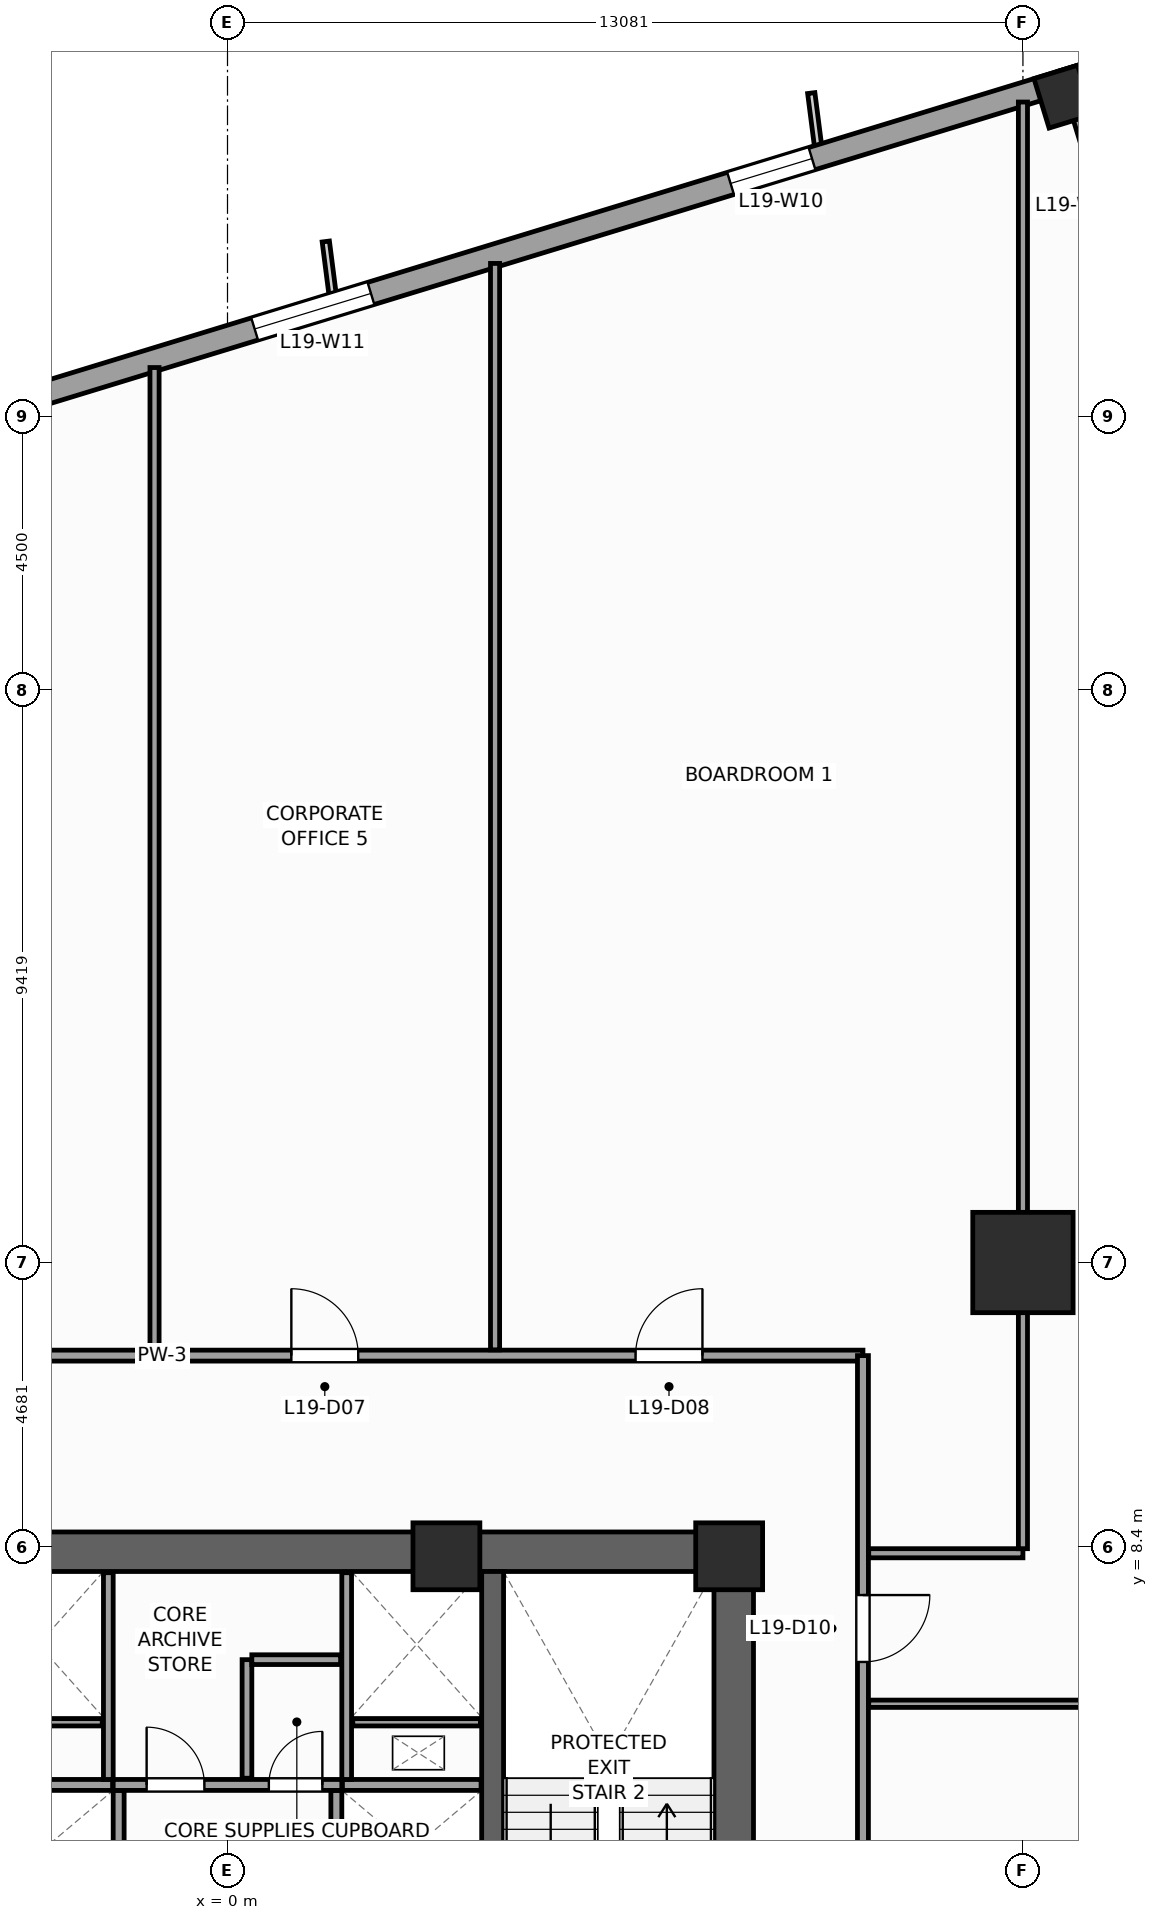
"""IFC4 building model, lengths in metres.
Left out: names, types, materials, properties, quantities, classifications, styles, units other than length and angle.
Written with IfcOpenShell. Run it as: python <this file> out.ifc"""

import sys

from ifc_helpers import new_model, si_unit, direction, frame, frame_2d, origin, origin_2d, place, context, subcontext, project, spatial, rectangle, extrude, source, transform, mapped, element, fill, save


model = new_model("IFC4")
c1 = context("Model", 3, precision=1e-05, world=origin(), true_north=direction((0.0, 1.0)))
c2 = subcontext(c1, "Body", "Model", "MODEL_VIEW")
j1 = project(units=[si_unit("LENGTHUNIT", "METRE"), si_unit("PLANEANGLEUNIT", "RADIAN")], contexts=[c1])
p1 = place(None, origin())
s1 = spatial("IfcSite", under=j1, at=p1, CompositionType="ELEMENT")
p2 = place(p1, origin())
s2 = spatial("IfcBuilding", under=s1, at=p2, CompositionType="ELEMENT")
p3 = place(p2, frame((0.0, 0.0, 83.2)))
s3 = spatial("IfcBuildingStorey", under=s2, at=p3, CompositionType="ELEMENT", Elevation=83.2)
p4 = place(p3, frame((-8.65, 8.325, 0.0), z_axis=(0.0, 0.0, 1.0), x_axis=(1.0, 0.0, 0.0)))
e1 = element("IfcWall", 1, at=p4, inside=s3, PredefinedType="SHEAR", context=c2, shape_type="SweptSolid", body=[
    extrude(rectangle(XDim=17.3, YDim=0.65, at=frame_2d((8.65, 0.0))), origin(), (0.0, 0.0, 1.0), 4.0),
])
p5 = place(p3, frame((8.325, -8.0, 0.0), z_axis=(0.0, 0.0, 1.0), x_axis=(0.0, 1.0, 0.0)))
e2 = element("IfcWall", 2, at=p5, inside=s3, PredefinedType="SHEAR", context=c2, shape_type="SweptSolid", body=[
    extrude(rectangle(XDim=16.0, YDim=0.65, at=frame_2d((8.0, 0.0))), origin(), (0.0, 0.0, 1.0), 4.0),
])
p6 = place(p5, frame((4.69, 0.0, 0.0)))
e3 = element("IfcOpeningElement", 3, at=p6, cuts=e2, PredefinedType="OPENING", context=c2, shape_type="SweptSolid", body=[
    extrude(rectangle(XDim=1.3, YDim=2.2, at=frame_2d((0.65, 1.1))), frame((0.0, 0.335, 0.0), z_axis=(0.0, -1.0, 0.0), x_axis=(1.0, 0.0, 0.0)), (0.0, 0.0, 1.0), 0.67),
])
p7 = place(p3, frame((4.36, -8.0, 0.0), z_axis=(0.0, 0.0, 1.0), x_axis=(0.0, 1.0, 0.0)))
e4 = element("IfcWall", 4, at=p7, inside=s3, PredefinedType="SHEAR", context=c2, shape_type="SweptSolid", body=[
    extrude(rectangle(XDim=16.0, YDim=0.36, at=frame_2d((8.0, 0.0))), origin(), (0.0, 0.0, 1.0), 4.0),
])
m1 = source(origin(), c2, "Body", "SweptSolid", [
    extrude(rectangle(XDim=1.1, YDim=1.1, at=origin_2d()), origin(), (0.0, 0.0, 1.0), 4.0),
])
for number, where, z_axis, x_axis in (
    (5, (8.25, 8.25, 0.0), (0.0, 0.0, 1.0), (1.0, 0.0, 0.0)),
    (6, (3.6, 8.25, 0.0), (0.0, 0.0, 1.0), (1.0, 0.0, 0.0)),
):
    element("IfcColumn", number, at=place(p3, frame(where, z_axis=z_axis, x_axis=x_axis)), inside=s3, PredefinedType="PILASTER", context=c2, shape_type="MappedRepresentation", body=[
        mapped(m1, transform((0.0, 0.0, 0.0), scale=1.0)),
    ])
m2 = source(origin(), c2, "Body", "SweptSolid", [
    extrude(rectangle(XDim=1.65, YDim=1.65, at=origin_2d()), origin(), (0.0, 0.0, 1.0), 4.0),
])
p8 = place(p3, frame((13.081, 13.081, 0.0), z_axis=(0.0, 0.0, 1.0), x_axis=(1.0, 0.0, 0.0)))
e7 = element("IfcColumn", 7, at=p8, inside=s3, PredefinedType="COLUMN", context=c2, shape_type="MappedRepresentation", body=[
    mapped(m2, transform((0.0, 0.0, 0.0), scale=1.0)),
])
m3 = source(origin(), c2, "Body", "SweptSolid", [
    extrude(rectangle(XDim=0.75, YDim=0.85, at=origin_2d()), origin(), (0.0, 0.0, 1.0), 4.0),
])
p9 = place(p3, frame((13.746, 32.253, 0.0), z_axis=(0.0, 0.0, 1.0), x_axis=(0.956304755963, 0.292371704723, 0.0)))
e8 = element("IfcColumn", 8, at=p9, inside=s3, PredefinedType="COLUMN", context=c2, shape_type="MappedRepresentation", body=[
    mapped(m3, transform((0.0, 0.0, 0.0), scale=1.0)),
])
p10 = place(p3, frame((15.144, 28.482, 0.0), z_axis=(0.0, 0.0, 1.0), x_axis=(-0.292373601522, 0.956304176051, 0.0)))
e9 = element("IfcWall", 9, at=p10, inside=s3, PredefinedType="STANDARD", context=c2, shape_type="SweptSolid", body=[
    extrude(rectangle(XDim=4.44, YDim=0.38, at=frame_2d((2.22, 0.0))), origin(), (0.0, 0.0, 1.0), 3.04),
])
p11 = place(p10, frame((1.52, 0.0, 0.51)))
e10 = element("IfcOpeningElement", 10, at=p11, cuts=e9, PredefinedType="OPENING", context=c2, shape_type="SweptSolid", body=[
    extrude(rectangle(XDim=1.4, YDim=2.4, at=frame_2d((0.7, 1.2))), frame((0.0, 0.2, 0.0), z_axis=(0.0, -1.0, 0.0), x_axis=(1.0, 0.0, 0.0)), (0.0, 0.0, 1.0), 0.4),
])
p12 = place(p3, frame((14.265, 32.658, 0.0), z_axis=(0.0, 0.0, 1.0), x_axis=(-0.956304320851, -0.292373127906, 0.0)))
e11 = element("IfcWall", 11, at=p12, inside=s3, PredefinedType="STANDARD", context=c2, shape_type="SweptSolid", body=[
    extrude(rectangle(XDim=46.38, YDim=0.38, at=frame_2d((23.19, 0.0))), origin(), (0.0, 0.0, 1.0), 3.14),
])
p13 = place(p12, frame((4.865, 0.0, 0.51)))
e12 = element("IfcOpeningElement", 12, at=p13, cuts=e11, PredefinedType="OPENING", context=c2, shape_type="SweptSolid", body=[
    extrude(rectangle(XDim=1.4, YDim=2.4, at=frame_2d((0.7, 1.2))), frame((0.0, 0.2, 0.0), z_axis=(0.0, -1.0, 0.0), x_axis=(1.0, 0.0, 0.0)), (0.0, 0.0, 1.0), 0.4),
])
p14 = place(p12, frame((12.45, 0.0, 0.51)))
e13 = element("IfcOpeningElement", 13, at=p14, cuts=e11, PredefinedType="OPENING", context=c2, shape_type="SweptSolid", body=[
    extrude(rectangle(XDim=2.0, YDim=2.4, at=frame_2d((1.0, 1.2))), frame((0.0, 0.2, 0.0), z_axis=(0.0, -1.0, 0.0), x_axis=(1.0, 0.0, 0.0)), (0.0, 0.0, 1.0), 0.4),
])
p15 = place(p12, frame((19.012, 0.0, 0.51)))
e14 = element("IfcOpeningElement", 14, at=p15, cuts=e11, PredefinedType="OPENING", context=c2, shape_type="SweptSolid", body=[
    extrude(rectangle(XDim=2.0, YDim=2.4, at=frame_2d((1.0, 1.2))), frame((0.0, 0.2, 0.0), z_axis=(0.0, -1.0, 0.0), x_axis=(1.0, 0.0, 0.0)), (0.0, 0.0, 1.0), 0.4),
])
p16 = place(p12, frame((30.538, 0.0, 0.51)))
e15 = element("IfcOpeningElement", 15, at=p16, cuts=e11, PredefinedType="OPENING", context=c2, shape_type="SweptSolid", body=[
    extrude(rectangle(XDim=2.0, YDim=2.4, at=frame_2d((1.0, 1.2))), frame((0.0, 0.2, 0.0), z_axis=(0.0, -1.0, 0.0), x_axis=(1.0, 0.0, 0.0)), (0.0, 0.0, 1.0), 0.4),
])
p17 = place(p12, frame((39.187, 0.0, 0.51)))
e16 = element("IfcOpeningElement", 16, at=p17, cuts=e11, PredefinedType="OPENING", context=c2, shape_type="SweptSolid", body=[
    extrude(rectangle(XDim=1.4, YDim=2.4, at=frame_2d((0.7, 1.2))), frame((0.0, 0.2, 0.0), z_axis=(0.0, -1.0, 0.0), x_axis=(1.0, 0.0, 0.0)), (0.0, 0.0, 1.0), 0.4),
])
p18 = place(p3, frame((-1.79, -7.98, 0.0), z_axis=(0.0, 0.0, 1.0), x_axis=(0.0, 1.0, 0.0)))
e17 = element("IfcWall", 17, at=p18, inside=s3, PredefinedType="PARTITIONING", context=c2, shape_type="SweptSolid", body=[
    extrude(rectangle(XDim=12.38, YDim=0.18, at=frame_2d((6.19, 0.0))), origin(), (0.0, 0.0, 1.0), 3.74),
])
p19 = place(p18, frame((0.4, 0.0, 0.0)))
e18 = element("IfcOpeningElement", 18, at=p19, cuts=e17, PredefinedType="OPENING", context=c2, shape_type="SweptSolid", body=[
    extrude(rectangle(XDim=1.1, YDim=2.2, at=frame_2d((0.55, 1.1))), frame((0.0, 0.1, 0.0), z_axis=(0.0, -1.0, 0.0), x_axis=(1.0, 0.0, 0.0)), (0.0, 0.0, 1.0), 0.2),
])
p20 = place(p18, frame((2.46, 0.0, 0.0)))
e19 = element("IfcOpeningElement", 19, at=p20, cuts=e17, PredefinedType="OPENING", context=c2, shape_type="SweptSolid", body=[
    extrude(rectangle(XDim=1.1, YDim=2.2, at=frame_2d((0.55, 1.1))), frame((0.0, 0.1, 0.0), z_axis=(0.0, -1.0, 0.0), x_axis=(1.0, 0.0, 0.0)), (0.0, 0.0, 1.0), 0.2),
])
p21 = place(p3, frame((1.79, -7.98, 0.0), z_axis=(0.0, 0.0, 1.0), x_axis=(0.0, 1.0, 0.0)))
e20 = element("IfcWall", 20, at=p21, inside=s3, PredefinedType="PARTITIONING", context=c2, shape_type="SweptSolid", body=[
    extrude(rectangle(XDim=12.38, YDim=0.18, at=frame_2d((6.19, 0.0))), origin(), (0.0, 0.0, 1.0), 3.74),
])
p22 = place(p21, frame((0.4, 0.0, 0.0)))
e21 = element("IfcOpeningElement", 21, at=p22, cuts=e20, PredefinedType="OPENING", context=c2, shape_type="SweptSolid", body=[
    extrude(rectangle(XDim=1.1, YDim=2.2, at=frame_2d((0.55, 1.1))), frame((0.0, 0.1, 0.0), z_axis=(0.0, -1.0, 0.0), x_axis=(1.0, 0.0, 0.0)), (0.0, 0.0, 1.0), 0.2),
])
p23 = place(p21, frame((2.46, 0.0, 0.0)))
e22 = element("IfcOpeningElement", 22, at=p23, cuts=e20, PredefinedType="OPENING", context=c2, shape_type="SweptSolid", body=[
    extrude(rectangle(XDim=1.1, YDim=2.2, at=frame_2d((0.55, 1.1))), frame((0.0, 0.1, 0.0), z_axis=(0.0, -1.0, 0.0), x_axis=(1.0, 0.0, 0.0)), (0.0, 0.0, 1.0), 0.2),
])
p24 = place(p3, frame((-1.88, 4.49, 0.0), z_axis=(0.0, 0.0, 1.0), x_axis=(1.0, 0.0, 0.0)))
e23 = element("IfcWall", 23, at=p24, inside=s3, PredefinedType="PARTITIONING", context=c2, shape_type="SweptSolid", body=[
    extrude(rectangle(XDim=3.76, YDim=0.18, at=frame_2d((1.88, 0.0))), origin(), (0.0, 0.0, 1.0), 3.74),
])
p25 = place(p24, frame((0.55, 0.0, 0.0)))
e24 = element("IfcOpeningElement", 24, at=p25, cuts=e23, PredefinedType="OPENING", context=c2, shape_type="SweptSolid", body=[
    extrude(rectangle(XDim=0.95, YDim=2.1, at=frame_2d((0.475, 1.05))), frame((0.0, 0.1, 0.0), z_axis=(0.0, -1.0, 0.0), x_axis=(1.0, 0.0, 0.0)), (0.0, 0.0, 1.0), 0.2),
])
p26 = place(p24, frame((2.56, 0.0, 0.0)))
e25 = element("IfcOpeningElement", 25, at=p26, cuts=e23, PredefinedType="OPENING", context=c2, shape_type="SweptSolid", body=[
    extrude(rectangle(XDim=0.88, YDim=2.1, at=frame_2d((0.44, 1.05))), frame((0.0, 0.1, 0.0), z_axis=(0.0, -1.0, 0.0), x_axis=(1.0, 0.0, 0.0)), (0.0, 0.0, 1.0), 0.2),
])
for number, where, z_axis, x_axis in (
    (26, (-4.17, 4.49, 0.0), (0.0, 0.0, 1.0), (1.0, 0.0, 0.0)),
    (27, (1.89, 4.49, 0.0), (0.0, 0.0, 1.0), (1.0, 0.0, 0.0)),
):
    element("IfcWall", number, at=place(p3, frame(where, z_axis=z_axis, x_axis=x_axis)), inside=s3, PredefinedType="PARTITIONING", context=c2, shape_type="SweptSolid", body=[
        extrude(rectangle(XDim=2.28, YDim=0.18, at=frame_2d((1.14, 0.0))), origin(), (0.0, 0.0, 1.0), 3.74),
    ])
for number, where, z_axis, x_axis in (
    (28, (-1.96, 4.58, 0.0), (0.0, 0.0, 1.0), (0.0, 1.0, 0.0)),
    (29, (1.96, 4.58, 0.0), (0.0, 0.0, 1.0), (0.0, 1.0, 0.0)),
):
    element("IfcWall", number, at=place(p3, frame(where, z_axis=z_axis, x_axis=x_axis)), inside=s3, PredefinedType="PARTITIONING", context=c2, shape_type="SweptSolid", body=[
        extrude(rectangle(XDim=3.4, YDim=0.16, at=frame_2d((1.7, 0.0))), origin(), (0.0, 0.0, 1.0), 3.74),
    ])
for number, where, z_axis, x_axis in (
    (30, (-4.16, 5.52, 0.0), (0.0, 0.0, 1.0), (1.0, 0.0, 0.0)),
    (31, (2.06, 5.52, 0.0), (0.0, 0.0, 1.0), (1.0, 0.0, 0.0)),
):
    element("IfcWall", number, at=place(p3, frame(where, z_axis=z_axis, x_axis=x_axis)), inside=s3, PredefinedType="PARTITIONING", context=c2, shape_type="SweptSolid", body=[
        extrude(rectangle(XDim=2.1, YDim=0.12, at=frame_2d((1.05, 0.0))), origin(), (0.0, 0.0, 1.0), 3.74),
    ])
p27 = place(p3, frame((0.32, 4.6, 0.0), z_axis=(0.0, 0.0, 1.0), x_axis=(0.0, 1.0, 0.0)))
e32 = element("IfcWall", 32, at=p27, inside=s3, PredefinedType="PARTITIONING", context=c2, shape_type="SweptSolid", body=[
    extrude(rectangle(XDim=1.95, YDim=0.16, at=frame_2d((0.975, 0.0))), origin(), (0.0, 0.0, 1.0), 3.74),
])
p28 = place(p3, frame((0.4, 6.55, 0.0), z_axis=(0.0, 0.0, 1.0), x_axis=(1.0, 0.0, 0.0)))
e33 = element("IfcWall", 33, at=p28, inside=s3, PredefinedType="PARTITIONING", context=c2, shape_type="SweptSolid", body=[
    extrude(rectangle(XDim=1.46, YDim=0.16, at=frame_2d((0.73, 0.0))), origin(), (0.0, 0.0, 1.0), 3.74),
])
p29 = place(p3, frame((-12.6, 11.55, 0.0), z_axis=(0.0, 0.0, 1.0), x_axis=(1.0, 0.0, 0.0)))
e34 = element("IfcWall", 34, at=p29, inside=s3, PredefinedType="PARTITIONING", context=c2, shape_type="SweptSolid", body=[
    extrude(rectangle(XDim=23.05, YDim=0.18, at=frame_2d((11.525, 0.0))), origin(), (0.0, 0.0, 1.0), 3.74),
])
p30 = place(p29, frame((2.514, 0.0, 0.0)))
e35 = element("IfcOpeningElement", 35, at=p30, cuts=e34, PredefinedType="OPENING", context=c2, shape_type="SweptSolid", body=[
    extrude(rectangle(XDim=1.1, YDim=2.2, at=frame_2d((0.55, 1.1))), frame((0.0, 0.1, 0.0), z_axis=(0.0, -1.0, 0.0), x_axis=(1.0, 0.0, 0.0)), (0.0, 0.0, 1.0), 0.2),
])
p31 = place(p29, frame((8.05, 0.0, 0.0)))
e36 = element("IfcOpeningElement", 36, at=p31, cuts=e34, PredefinedType="OPENING", context=c2, shape_type="SweptSolid", body=[
    extrude(rectangle(XDim=1.1, YDim=2.2, at=frame_2d((0.55, 1.1))), frame((0.0, 0.1, 0.0), z_axis=(0.0, -1.0, 0.0), x_axis=(1.0, 0.0, 0.0)), (0.0, 0.0, 1.0), 0.2),
])
p32 = place(p29, frame((13.65, 0.0, 0.0)))
e37 = element("IfcOpeningElement", 37, at=p32, cuts=e34, PredefinedType="OPENING", context=c2, shape_type="SweptSolid", body=[
    extrude(rectangle(XDim=1.1, YDim=2.2, at=frame_2d((0.55, 1.1))), frame((0.0, 0.1, 0.0), z_axis=(0.0, -1.0, 0.0), x_axis=(1.0, 0.0, 0.0)), (0.0, 0.0, 1.0), 0.2),
])
p33 = place(p29, frame((19.311, 0.0, 0.0)))
e38 = element("IfcOpeningElement", 38, at=p33, cuts=e34, PredefinedType="OPENING", context=c2, shape_type="SweptSolid", body=[
    extrude(rectangle(XDim=1.1, YDim=2.2, at=frame_2d((0.55, 1.1))), frame((0.0, 0.1, 0.0), z_axis=(0.0, -1.0, 0.0), x_axis=(1.0, 0.0, 0.0)), (0.0, 0.0, 1.0), 0.2),
])
p34 = place(p3, frame((10.45, 3.35, 0.0), z_axis=(0.0, 0.0, 1.0), x_axis=(0.0, 1.0, 0.0)))
e39 = element("IfcWall", 39, at=p34, inside=s3, PredefinedType="PARTITIONING", context=c2, shape_type="SweptSolid", body=[
    extrude(rectangle(XDim=8.2, YDim=0.18, at=frame_2d((4.1, 0.0))), origin(), (0.0, 0.0, 1.0), 3.74),
])
p35 = place(p34, frame((3.163, 0.0, 0.0)))
e40 = element("IfcOpeningElement", 40, at=p35, cuts=e39, PredefinedType="OPENING", context=c2, shape_type="SweptSolid", body=[
    extrude(rectangle(XDim=1.1, YDim=2.2, at=frame_2d((0.55, 1.1))), frame((0.0, 0.1, 0.0), z_axis=(0.0, -1.0, 0.0), x_axis=(1.0, 0.0, 0.0)), (0.0, 0.0, 1.0), 0.2),
])
p36 = place(p3, frame((-1.2, 11.645, 0.0), z_axis=(0.0, 0.0, 1.0), x_axis=(0.0, 1.0, 0.0)))
e41 = element("IfcWall", 41, at=p36, inside=s3, PredefinedType="PARTITIONING", context=c2, shape_type="SweptSolid", body=[
    extrude(rectangle(XDim=16.154, YDim=0.15, at=frame_2d((8.077, 0.0))), origin(), (0.0, 0.0, 1.0), 3.74),
])
p37 = place(p3, frame((4.4, 11.645, 0.0), z_axis=(0.0, 0.0, 1.0), x_axis=(0.0, 1.0, 0.0)))
e42 = element("IfcWall", 42, at=p37, inside=s3, PredefinedType="PARTITIONING", context=c2, shape_type="SweptSolid", body=[
    extrude(rectangle(XDim=17.866, YDim=0.15, at=frame_2d((8.933, 0.0))), origin(), (0.0, 0.0, 1.0), 3.74),
])
p38 = place(p3, frame((10.545, 8.3, 0.0), z_axis=(0.0, 0.0, 1.0), x_axis=(1.0, 0.0, 0.0)))
e43 = element("IfcWall", 43, at=p38, inside=s3, PredefinedType="PARTITIONING", context=c2, shape_type="SweptSolid", body=[
    extrude(rectangle(XDim=2.536, YDim=0.15, at=frame_2d((1.268, 0.0))), origin(), (0.0, 0.0, 1.0), 3.74),
])
p39 = place(p3, frame((13.081, 8.375, 0.0), z_axis=(0.0, 0.0, 1.0), x_axis=(0.0, 1.0, 0.0)))
e44 = element("IfcWall", 44, at=p39, inside=s3, PredefinedType="PARTITIONING", context=c2, shape_type="SweptSolid", body=[
    extrude(rectangle(XDim=23.79, YDim=0.15, at=frame_2d((11.895, 0.0))), origin(), (0.0, 0.0, 1.0), 2.732),
])
p40 = place(p3, frame((10.545, 5.825, 0.0), z_axis=(0.0, 0.0, 1.0), x_axis=(1.0, 0.0, 0.0)))
e45 = element("IfcWall", 45, at=p40, inside=s3, PredefinedType="PARTITIONING", context=c2, shape_type="SweptSolid", body=[
    extrude(rectangle(XDim=15.84, YDim=0.12, at=frame_2d((7.92, 0.0))), origin(), (0.0, 0.0, 1.0), 3.74),
])
m4 = source(origin(), c2, "Body", "SweptSolid", [
    extrude(rectangle(XDim=1.4, YDim=2.4, at=frame_2d((0.7, 1.2))), frame((0.0, 0.03, 0.0), z_axis=(0.0, -1.0, 0.0), x_axis=(1.0, 0.0, 0.0)), (0.0, 0.0, 1.0), 0.06),
])
p41 = place(p13, origin())
e46 = element("IfcWindow", 46, at=p41, inside=s3, PartitioningType="SINGLE_PANEL", PredefinedType="WINDOW", context=c2, shape_type="MappedRepresentation", body=[
    mapped(m4, transform((0.0, 0.0, 0.0), scale=1.0)),
])
fill(e12, e46)
m5 = source(origin(), c2, "Body", "SweptSolid", [
    extrude(rectangle(XDim=2.0, YDim=2.4, at=frame_2d((1.0, 1.2))), frame((0.0, 0.03, 0.0), z_axis=(0.0, -1.0, 0.0), x_axis=(1.0, 0.0, 0.0)), (0.0, 0.0, 1.0), 0.06),
])
p42 = place(p14, origin())
e47 = element("IfcWindow", 47, at=p42, inside=s3, PartitioningType="SINGLE_PANEL", PredefinedType="WINDOW", context=c2, shape_type="MappedRepresentation", body=[
    mapped(m5, transform((0.0, 0.0, 0.0), scale=1.0)),
])
fill(e13, e47)
m6 = source(origin(), c2, "Body", "SweptSolid", [
    extrude(rectangle(XDim=0.95, YDim=2.1, at=frame_2d((0.475, 1.05))), frame((0.0, 0.025, 0.0), z_axis=(0.0, -1.0, 0.0), x_axis=(1.0, 0.0, 0.0)), (0.0, 0.0, 1.0), 0.05),
])
p43 = place(p25, origin())
e48 = element("IfcDoor", 48, at=p43, inside=s3, OperationType="SINGLE_SWING_LEFT", PredefinedType="DOOR", context=c2, shape_type="MappedRepresentation", body=[
    mapped(m6, transform((0.0, 0.0, 0.0), scale=1.0)),
])
fill(e24, e48)
m7 = source(origin(), c2, "Body", "SweptSolid", [
    extrude(rectangle(XDim=0.88, YDim=2.1, at=frame_2d((0.44, 1.05))), frame((0.0, 0.025, 0.0), z_axis=(0.0, -1.0, 0.0), x_axis=(1.0, 0.0, 0.0)), (0.0, 0.0, 1.0), 0.05),
])
p44 = place(p26, origin())
e49 = element("IfcDoor", 49, at=p44, inside=s3, OperationType="SINGLE_SWING_RIGHT", PredefinedType="DOOR", context=c2, shape_type="MappedRepresentation", body=[
    mapped(m7, transform((0.0, 0.0, 0.0), scale=1.0)),
])
fill(e25, e49)
m8 = source(origin(), c2, "Body", "SweptSolid", [
    extrude(rectangle(XDim=1.1, YDim=2.2, at=frame_2d((0.55, 1.1))), frame((0.0, 0.025, 0.0), z_axis=(0.0, -1.0, 0.0), x_axis=(1.0, 0.0, 0.0)), (0.0, 0.0, 1.0), 0.05),
])
p45 = place(p32, origin())
e50 = element("IfcDoor", 50, at=p45, inside=s3, OperationType="SINGLE_SWING_LEFT", PredefinedType="DOOR", context=c2, shape_type="MappedRepresentation", body=[
    mapped(m8, transform((0.0, 0.0, 0.0), scale=1.0)),
])
fill(e37, e50)
p46 = place(p33, origin())
e51 = element("IfcDoor", 51, at=p46, inside=s3, OperationType="SINGLE_SWING_RIGHT", PredefinedType="DOOR", context=c2, shape_type="MappedRepresentation", body=[
    mapped(m8, transform((0.0, 0.0, 0.0), scale=1.0)),
])
fill(e38, e51)
p47 = place(p35, frame((1.1, 0.0, 0.0), z_axis=(0.0, 0.0, 1.0), x_axis=(-1.0, 0.0, 0.0)))
e52 = element("IfcDoor", 52, at=p47, inside=s3, OperationType="SINGLE_SWING_RIGHT", PredefinedType="DOOR", context=c2, shape_type="MappedRepresentation", body=[
    mapped(m8, transform((0.0, 0.0, 0.0), scale=1.0)),
])
fill(e40, e52)
save(model, sys.argv[1])
